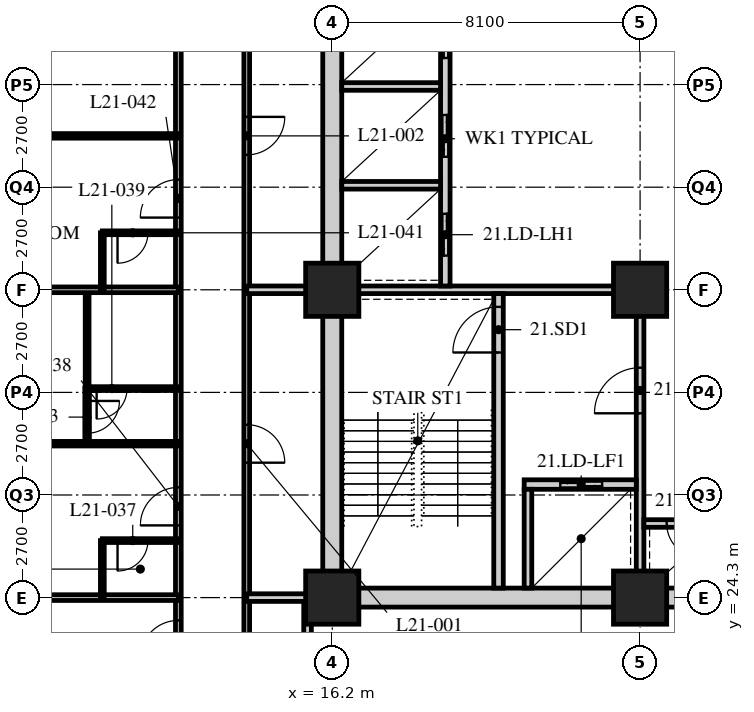
"""IFC4 building model, lengths in metres.
Left out: names, types, materials, properties, quantities, classifications, styles, units other than length and angle.
Written with IfcOpenShell. Run it as: python <this file> out.ifc"""

import sys

from ifc_helpers import new_model, si_unit, direction, frame, frame_2d, origin, origin_2d, place, context, subcontext, project, spatial, rectangle, hollow_rectangle, extrude, element, fill, save


model = new_model("IFC4")
c1 = context("Model", 3, precision=1e-05, world=origin(), true_north=direction((0.0, 1.0)))
c2 = subcontext(c1, "Body", "Model", "MODEL_VIEW")
j1 = project(units=[si_unit("LENGTHUNIT", "METRE"), si_unit("PLANEANGLEUNIT", "RADIAN")], contexts=[c1])
p1 = place(None, origin())
s1 = spatial("IfcSite", under=j1, at=p1, CompositionType="ELEMENT")
p2 = place(p1, origin())
s2 = spatial("IfcBuilding", under=s1, at=p2, CompositionType="ELEMENT")
p3 = place(p2, frame((0.0, 0.0, 84.0)))
s3 = spatial("IfcBuildingStorey", under=s2, at=p3, CompositionType="ELEMENT", Elevation=84.0)
for number, where, z_axis, x_axis in (
    (1, (16.2, 24.3, 0.0), (0.0, 0.0, 1.0), (1.0, 0.0, 0.0)),
    (2, (16.2, 32.4, 0.0), (0.0, 0.0, 1.0), (1.0, 0.0, 0.0)),
    (3, (24.3, 24.3, 0.0), (0.0, 0.0, 1.0), (1.0, 0.0, 0.0)),
    (4, (24.3, 32.4, 0.0), (0.0, 0.0, 1.0), (1.0, 0.0, 0.0)),
):
    element("IfcColumn", number, at=place(p3, frame(where, z_axis=z_axis, x_axis=x_axis)), inside=s3, PredefinedType="COLUMN", context=c2, shape_type="SweptSolid", body=[
        extrude(hollow_rectangle(XDim=1.4, YDim=1.4, WallThickness=0.12, at=origin_2d()), origin(), (0.0, 0.0, 1.0), 3.4),
    ])
p4 = place(p3, frame((12.15, 16.2, 0.0), z_axis=(0.0, 0.0, 1.0), x_axis=(0.0, 1.0, 0.0)))
e5 = element("IfcWall", 5, at=p4, inside=s3, PredefinedType="PARTITIONING", context=c2, shape_type="SweptSolid", body=[
    extrude(rectangle(XDim=26.1, YDim=0.15, at=frame_2d((13.05, 0.0))), origin(), (0.0, 0.0, 1.0), 3.19),
])
p5 = place(p4, frame((2.45, 0.0, 0.0)))
e6 = element("IfcOpeningElement", 6, at=p5, cuts=e5, PredefinedType="OPENING", context=c2, shape_type="SweptSolid", body=[
    extrude(rectangle(XDim=1.0, YDim=2.1, at=frame_2d((0.5, 1.05))), frame((0.0, 0.085, 0.0), z_axis=(0.0, -1.0, 0.0), x_axis=(1.0, 0.0, 0.0)), (0.0, 0.0, 1.0), 0.17),
])
p6 = place(p4, frame((6.5, 0.0, 0.0)))
e7 = element("IfcOpeningElement", 7, at=p6, cuts=e5, PredefinedType="OPENING", context=c2, shape_type="SweptSolid", body=[
    extrude(rectangle(XDim=1.0, YDim=2.1, at=frame_2d((0.5, 1.05))), frame((0.0, 0.085, 0.0), z_axis=(0.0, -1.0, 0.0), x_axis=(1.0, 0.0, 0.0)), (0.0, 0.0, 1.0), 0.17),
])
p7 = place(p4, frame((10.0, 0.0, 0.0)))
e8 = element("IfcOpeningElement", 8, at=p7, cuts=e5, PredefinedType="OPENING", context=c2, shape_type="SweptSolid", body=[
    extrude(rectangle(XDim=1.0, YDim=2.1, at=frame_2d((0.5, 1.05))), frame((0.0, 0.085, 0.0), z_axis=(0.0, -1.0, 0.0), x_axis=(1.0, 0.0, 0.0)), (0.0, 0.0, 1.0), 0.17),
])
p8 = place(p4, frame((18.1, 0.0, 0.0)))
e9 = element("IfcOpeningElement", 9, at=p8, cuts=e5, PredefinedType="OPENING", context=c2, shape_type="SweptSolid", body=[
    extrude(rectangle(XDim=1.0, YDim=2.1, at=frame_2d((0.5, 1.05))), frame((0.0, 0.085, 0.0), z_axis=(0.0, -1.0, 0.0), x_axis=(1.0, 0.0, 0.0)), (0.0, 0.0, 1.0), 0.17),
])
p9 = place(p3, frame((13.95, 40.5, 0.0), z_axis=(0.0, 0.0, 1.0), x_axis=(0.0, -1.0, 0.0)))
e10 = element("IfcWall", 10, at=p9, inside=s3, PredefinedType="PARTITIONING", context=c2, shape_type="SweptSolid", body=[
    extrude(rectangle(XDim=22.5, YDim=0.15, at=frame_2d((11.25, 0.0))), origin(), (0.0, 0.0, 1.0), 3.19),
])
p10 = place(p9, frame((11.65, 0.0, 0.0)))
e11 = element("IfcOpeningElement", 11, at=p10, cuts=e10, PredefinedType="OPENING", context=c2, shape_type="SweptSolid", body=[
    extrude(rectangle(XDim=1.0, YDim=2.1, at=frame_2d((0.5, 1.05))), frame((0.0, 0.085, 0.0), z_axis=(0.0, -1.0, 0.0), x_axis=(1.0, 0.0, 0.0)), (0.0, 0.0, 1.0), 0.17),
])
p11 = place(p9, frame((3.55, 0.0, 0.0)))
e12 = element("IfcOpeningElement", 12, at=p11, cuts=e10, PredefinedType="OPENING", context=c2, shape_type="SweptSolid", body=[
    extrude(rectangle(XDim=1.0, YDim=2.1, at=frame_2d((0.5, 1.05))), frame((0.0, 0.085, 0.0), z_axis=(0.0, -1.0, 0.0), x_axis=(1.0, 0.0, 0.0)), (0.0, 0.0, 1.0), 0.17),
])
p12 = place(p3, frame((13.95, 32.4, 0.0), z_axis=(0.0, 0.0, 1.0), x_axis=(1.0, 0.0, 0.0)))
e13 = element("IfcWall", 13, at=p12, inside=s3, PredefinedType="SOLIDWALL", context=c2, shape_type="SweptSolid", body=[
    extrude(rectangle(XDim=2.25, YDim=0.2, at=frame_2d((1.125, 0.0))), origin(), (0.0, 0.0, 1.0), 2.428),
])
p13 = place(p3, frame((15.55, 18.0, 0.0), z_axis=(0.0, 0.0, 1.0), x_axis=(0.0, 1.0, 0.0)))
e14 = element("IfcWall", 14, at=p13, inside=s3, PredefinedType="SOLIDWALL", context=c2, shape_type="SweptSolid", body=[
    extrude(rectangle(XDim=6.3, YDim=0.2, at=frame_2d((3.15, 0.0))), origin(), (0.0, 0.0, 1.0), 3.19),
])
p14 = place(p3, frame((13.95, 24.3, 0.0), z_axis=(0.0, 0.0, 1.0), x_axis=(1.0, 0.0, 0.0)))
e15 = element("IfcWall", 15, at=p14, inside=s3, PredefinedType="SOLIDWALL", context=c2, shape_type="SweptSolid", body=[
    extrude(rectangle(XDim=2.25, YDim=0.2, at=frame_2d((1.125, 0.0))), origin(), (0.0, 0.0, 1.0), 2.428),
])
p15 = place(p3, frame((12.15, 24.3, 0.0), z_axis=(0.0, 0.0, 1.0), x_axis=(-1.0, 0.0, 0.0)))
e16 = element("IfcWall", 16, at=p15, inside=s3, PredefinedType="PARTITIONING", context=c2, shape_type="SweptSolid", body=[
    extrude(rectangle(XDim=11.85, YDim=0.15, at=frame_2d((5.925, 0.0))), origin(), (0.0, 0.0, 1.0), 2.428),
])
p16 = place(p3, frame((10.15, 24.3, 0.0), z_axis=(0.0, 0.0, 1.0), x_axis=(0.0, 1.0, 0.0)))
e17 = element("IfcWall", 17, at=p16, inside=s3, PredefinedType="PARTITIONING", context=c2, shape_type="SweptSolid", body=[
    extrude(rectangle(XDim=1.5, YDim=0.1, at=frame_2d((0.75, 0.0))), origin(), (0.0, 0.0, 1.0), 3.19),
])
p17 = place(p3, frame((12.15, 25.8, 0.0), z_axis=(0.0, 0.0, 1.0), x_axis=(-1.0, 0.0, 0.0)))
e18 = element("IfcWall", 18, at=p17, inside=s3, PredefinedType="PARTITIONING", context=c2, shape_type="SweptSolid", body=[
    extrude(rectangle(XDim=2.0, YDim=0.1, at=frame_2d((1.0, 0.0))), origin(), (0.0, 0.0, 1.0), 3.19),
])
p18 = place(p17, frame((0.8, 0.0, 0.0)))
e19 = element("IfcOpeningElement", 19, at=p18, cuts=e18, PredefinedType="OPENING", context=c2, shape_type="SweptSolid", body=[
    extrude(rectangle(XDim=0.8, YDim=2.1, at=frame_2d((0.4, 1.05))), frame((0.0, 0.06, 0.0), z_axis=(0.0, -1.0, 0.0), x_axis=(1.0, 0.0, 0.0)), (0.0, 0.0, 1.0), 0.12),
])
p19 = place(p3, frame((9.75, 29.8, 0.0), z_axis=(0.0, 0.0, 1.0), x_axis=(0.0, 1.0, 0.0)))
e20 = element("IfcWall", 20, at=p19, inside=s3, PredefinedType="PARTITIONING", context=c2, shape_type="SweptSolid", body=[
    extrude(rectangle(XDim=2.6, YDim=0.1, at=frame_2d((1.3, 0.0))), origin(), (0.0, 0.0, 1.0), 3.19),
])
p20 = place(p3, frame((12.15, 29.8, 0.0), z_axis=(0.0, 0.0, 1.0), x_axis=(-1.0, 0.0, 0.0)))
e21 = element("IfcWall", 21, at=p20, inside=s3, PredefinedType="PARTITIONING", context=c2, shape_type="SweptSolid", body=[
    extrude(rectangle(XDim=2.4, YDim=0.1, at=frame_2d((1.2, 0.0))), origin(), (0.0, 0.0, 1.0), 3.19),
])
p21 = place(p20, frame((1.35, 0.0, 0.0)))
e22 = element("IfcOpeningElement", 22, at=p21, cuts=e21, PredefinedType="OPENING", context=c2, shape_type="SweptSolid", body=[
    extrude(rectangle(XDim=0.8, YDim=2.1, at=frame_2d((0.4, 1.05))), frame((0.0, 0.06, 0.0), z_axis=(0.0, -1.0, 0.0), x_axis=(1.0, 0.0, 0.0)), (0.0, 0.0, 1.0), 0.12),
])
p22 = place(p3, frame((12.15, 28.35, 0.0), z_axis=(0.0, 0.0, 1.0), x_axis=(-1.0, 0.0, 0.0)))
e23 = element("IfcWall", 23, at=p22, inside=s3, PredefinedType="PARTITIONING", context=c2, shape_type="SweptSolid", body=[
    extrude(rectangle(XDim=11.85, YDim=0.12, at=frame_2d((5.925, 0.0))), origin(), (0.0, 0.0, 1.0), 3.19),
])
p23 = place(p22, frame((6.85, 0.0, 0.0)))
e24 = element("IfcOpeningElement", 24, at=p23, cuts=e23, PredefinedType="OPENING", context=c2, shape_type="SweptSolid", body=[
    extrude(rectangle(XDim=0.85, YDim=2.1, at=frame_2d((0.425, 1.05))), frame((0.0, 0.07, 0.0), z_axis=(0.0, -1.0, 0.0), x_axis=(1.0, 0.0, 0.0)), (0.0, 0.0, 1.0), 0.14),
])
p24 = place(p3, frame((12.15, 32.4, 0.0), z_axis=(0.0, 0.0, 1.0), x_axis=(-1.0, 0.0, 0.0)))
e25 = element("IfcWall", 25, at=p24, inside=s3, PredefinedType="PARTITIONING", context=c2, shape_type="SweptSolid", body=[
    extrude(rectangle(XDim=11.85, YDim=0.15, at=frame_2d((5.925, 0.0))), origin(), (0.0, 0.0, 1.0), 2.428),
])
p25 = place(p3, frame((10.15, 32.4, 0.0), z_axis=(0.0, 0.0, 1.0), x_axis=(0.0, 1.0, 0.0)))
e26 = element("IfcWall", 26, at=p25, inside=s3, PredefinedType="PARTITIONING", context=c2, shape_type="SweptSolid", body=[
    extrude(rectangle(XDim=1.5, YDim=0.1, at=frame_2d((0.75, 0.0))), origin(), (0.0, 0.0, 1.0), 3.19),
])
p26 = place(p3, frame((12.15, 33.9, 0.0), z_axis=(0.0, 0.0, 1.0), x_axis=(-1.0, 0.0, 0.0)))
e27 = element("IfcWall", 27, at=p26, inside=s3, PredefinedType="PARTITIONING", context=c2, shape_type="SweptSolid", body=[
    extrude(rectangle(XDim=2.0, YDim=0.1, at=frame_2d((1.0, 0.0))), origin(), (0.0, 0.0, 1.0), 3.19),
])
p27 = place(p26, frame((0.8, 0.0, 0.0)))
e28 = element("IfcOpeningElement", 28, at=p27, cuts=e27, PredefinedType="OPENING", context=c2, shape_type="SweptSolid", body=[
    extrude(rectangle(XDim=0.8, YDim=2.1, at=frame_2d((0.4, 1.05))), frame((0.0, 0.06, 0.0), z_axis=(0.0, -1.0, 0.0), x_axis=(1.0, 0.0, 0.0)), (0.0, 0.0, 1.0), 0.12),
])
p28 = place(p3, frame((12.15, 36.45, 0.0), z_axis=(0.0, 0.0, 1.0), x_axis=(-1.0, 0.0, 0.0)))
e29 = element("IfcWall", 29, at=p28, inside=s3, PredefinedType="PARTITIONING", context=c2, shape_type="SweptSolid", body=[
    extrude(rectangle(XDim=11.85, YDim=0.12, at=frame_2d((5.925, 0.0))), origin(), (0.0, 0.0, 1.0), 3.19),
])
p29 = place(p28, frame((6.85, 0.0, 0.0)))
e30 = element("IfcOpeningElement", 30, at=p29, cuts=e29, PredefinedType="OPENING", context=c2, shape_type="SweptSolid", body=[
    extrude(rectangle(XDim=0.85, YDim=2.1, at=frame_2d((0.425, 1.05))), frame((0.0, 0.07, 0.0), z_axis=(0.0, -1.0, 0.0), x_axis=(1.0, 0.0, 0.0)), (0.0, 0.0, 1.0), 0.14),
])
p30 = place(p3, frame((9.75, 28.35, 0.0), z_axis=(0.0, 0.0, 1.0), x_axis=(0.0, 1.0, 0.0)))
e31 = element("IfcWall", 31, at=p30, inside=s3, PredefinedType="PARTITIONING", context=c2, shape_type="SweptSolid", body=[
    extrude(rectangle(XDim=1.46, YDim=0.12, at=frame_2d((0.73, 0.0))), origin(), (0.0, 0.0, 1.0), 3.19),
])
p31 = place(p30, frame((0.275, 0.0, 0.0)))
e32 = element("IfcOpeningElement", 32, at=p31, cuts=e31, PredefinedType="OPENING", context=c2, shape_type="SweptSolid", body=[
    extrude(rectangle(XDim=0.85, YDim=2.1, at=frame_2d((0.425, 1.05))), frame((0.0, 0.07, 0.0), z_axis=(0.0, -1.0, 0.0), x_axis=(1.0, 0.0, 0.0)), (0.0, 0.0, 1.0), 0.14),
])
p32 = place(p3, frame((15.95, 24.3, 0.0), z_axis=(0.0, 0.0, 1.0), x_axis=(1.0, 0.0, 0.0)))
e33 = element("IfcWall", 33, at=p32, inside=s3, PredefinedType="SOLIDWALL", context=c2, shape_type="SweptSolid", body=[
    extrude(rectangle(XDim=24.8, YDim=0.5, at=frame_2d((12.4, 0.0))), origin(), (0.0, 0.0, 1.0), 2.428),
])
p33 = place(p32, frame((11.5, 0.0, 0.0)))
e34 = element("IfcOpeningElement", 34, at=p33, cuts=e33, PredefinedType="OPENING", context=c2, shape_type="SweptSolid", body=[
    extrude(rectangle(XDim=1.8, YDim=2.4, at=frame_2d((0.9, 1.2))), frame((0.0, 0.26, 0.0), z_axis=(0.0, -1.0, 0.0), x_axis=(1.0, 0.0, 0.0)), (0.0, 0.0, 1.0), 0.52),
])
p34 = place(p3, frame((16.2, 24.55, 0.0), z_axis=(0.0, 0.0, 1.0), x_axis=(0.0, 1.0, 0.0)))
e35 = element("IfcWall", 35, at=p34, inside=s3, PredefinedType="SOLIDWALL", context=c2, shape_type="SweptSolid", body=[
    extrude(rectangle(XDim=15.7, YDim=0.5, at=frame_2d((7.85, 0.0))), origin(), (0.0, 0.0, 1.0), 2.428),
])
p35 = place(p3, frame((16.45, 32.4, 0.0), z_axis=(0.0, 0.0, 1.0), x_axis=(1.0, 0.0, 0.0)))
e36 = element("IfcWall", 36, at=p35, inside=s3, PredefinedType="SOLIDWALL", context=c2, shape_type="SweptSolid", body=[
    extrude(rectangle(XDim=7.95, YDim=0.2, at=frame_2d((3.975, 0.0))), origin(), (0.0, 0.0, 1.0), 2.578),
])
p36 = place(p3, frame((24.3, 24.55, 0.0), z_axis=(0.0, 0.0, 1.0), x_axis=(0.0, 1.0, 0.0)))
e37 = element("IfcWall", 37, at=p36, inside=s3, PredefinedType="SOLIDWALL", context=c2, shape_type="SweptSolid", body=[
    extrude(rectangle(XDim=7.75, YDim=0.2, at=frame_2d((3.875, 0.0))), origin(), (0.0, 0.0, 1.0), 2.578),
])
p37 = place(p36, frame((4.6, 0.0, 0.0)))
e38 = element("IfcOpeningElement", 38, at=p37, cuts=e37, PredefinedType="OPENING", context=c2, shape_type="SweptSolid", body=[
    extrude(rectangle(XDim=1.2, YDim=2.1, at=frame_2d((0.6, 1.05))), frame((0.0, 0.11, 0.0), z_axis=(0.0, -1.0, 0.0), x_axis=(1.0, 0.0, 0.0)), (0.0, 0.0, 1.0), 0.22),
])
p38 = place(p3, frame((20.575, 24.55, 0.0), z_axis=(0.0, 0.0, 1.0), x_axis=(0.0, 1.0, 0.0)))
e39 = element("IfcWall", 39, at=p38, inside=s3, PredefinedType="SOLIDWALL", context=c2, shape_type="SweptSolid", body=[
    extrude(rectangle(XDim=7.75, YDim=0.25, at=frame_2d((3.875, 0.0))), origin(), (0.0, 0.0, 1.0), 3.19),
])
p39 = place(p38, frame((6.2, 0.0, 0.0)))
e40 = element("IfcOpeningElement", 40, at=p39, cuts=e39, PredefinedType="OPENING", context=c2, shape_type="SweptSolid", body=[
    extrude(rectangle(XDim=1.2, YDim=2.1, at=frame_2d((0.6, 1.05))), frame((0.0, 0.135, 0.0), z_axis=(0.0, -1.0, 0.0), x_axis=(1.0, 0.0, 0.0)), (0.0, 0.0, 1.0), 0.27),
])
p40 = place(p3, frame((21.25, 27.275, 0.0), z_axis=(0.0, 0.0, 1.0), x_axis=(1.0, 0.0, 0.0)))
e41 = element("IfcWall", 41, at=p40, inside=s3, PredefinedType="SOLIDWALL", context=c2, shape_type="SweptSolid", body=[
    extrude(rectangle(XDim=2.95, YDim=0.25, at=frame_2d((1.475, 0.0))), origin(), (0.0, 0.0, 1.0), 3.19),
])
p41 = place(p40, frame((0.95, 0.0, 0.0)))
e42 = element("IfcOpeningElement", 42, at=p41, cuts=e41, PredefinedType="OPENING", context=c2, shape_type="SweptSolid", body=[
    extrude(rectangle(XDim=1.1, YDim=2.4, at=frame_2d((0.55, 1.2))), frame((0.0, 0.135, 0.0), z_axis=(0.0, -1.0, 0.0), x_axis=(1.0, 0.0, 0.0)), (0.0, 0.0, 1.0), 0.27),
])
p42 = place(p3, frame((21.35, 24.55, 0.0), z_axis=(0.0, 0.0, 1.0), x_axis=(0.0, 1.0, 0.0)))
e43 = element("IfcWall", 43, at=p42, inside=s3, PredefinedType="SOLIDWALL", context=c2, shape_type="SweptSolid", body=[
    extrude(rectangle(XDim=2.6, YDim=0.2, at=frame_2d((1.3, 0.0))), origin(), (0.0, 0.0, 1.0), 3.19),
])
p43 = place(p3, frame((19.175, 32.5, 0.0), z_axis=(0.0, 0.0, 1.0), x_axis=(0.0, 1.0, 0.0)))
e44 = element("IfcWall", 44, at=p43, inside=s3, PredefinedType="SOLIDWALL", context=c2, shape_type="SweptSolid", body=[
    extrude(rectangle(XDim=7.75, YDim=0.25, at=frame_2d((3.875, 0.0))), origin(), (0.0, 0.0, 1.0), 3.19),
])
p44 = place(p43, frame((0.8, 0.0, 0.0)))
e45 = element("IfcOpeningElement", 45, at=p44, cuts=e44, PredefinedType="OPENING", context=c2, shape_type="SweptSolid", body=[
    extrude(rectangle(XDim=1.1, YDim=2.4, at=frame_2d((0.55, 1.2))), frame((0.0, 0.135, 0.0), z_axis=(0.0, -1.0, 0.0), x_axis=(1.0, 0.0, 0.0)), (0.0, 0.0, 1.0), 0.27),
])
p45 = place(p43, frame((3.4, 0.0, 0.0)))
e46 = element("IfcOpeningElement", 46, at=p45, cuts=e44, PredefinedType="OPENING", context=c2, shape_type="SweptSolid", body=[
    extrude(rectangle(XDim=1.1, YDim=2.4, at=frame_2d((0.55, 1.2))), frame((0.0, 0.135, 0.0), z_axis=(0.0, -1.0, 0.0), x_axis=(1.0, 0.0, 0.0)), (0.0, 0.0, 1.0), 0.27),
])
p46 = place(p43, frame((6.0, 0.0, 0.0)))
e47 = element("IfcOpeningElement", 47, at=p46, cuts=e44, PredefinedType="OPENING", context=c2, shape_type="SweptSolid", body=[
    extrude(rectangle(XDim=1.1, YDim=2.4, at=frame_2d((0.55, 1.2))), frame((0.0, 0.135, 0.0), z_axis=(0.0, -1.0, 0.0), x_axis=(1.0, 0.0, 0.0)), (0.0, 0.0, 1.0), 0.27),
])
for number, where, z_axis, x_axis in (
    (48, (16.45, 35.15, 0.0), (0.0, 0.0, 1.0), (1.0, 0.0, 0.0)),
    (49, (16.45, 37.75, 0.0), (0.0, 0.0, 1.0), (1.0, 0.0, 0.0)),
):
    element("IfcWall", number, at=place(p3, frame(where, z_axis=z_axis, x_axis=x_axis)), inside=s3, PredefinedType="SOLIDWALL", context=c2, shape_type="SweptSolid", body=[
        extrude(rectangle(XDim=2.6, YDim=0.2, at=frame_2d((1.3, 0.0))), origin(), (0.0, 0.0, 1.0), 3.19),
    ])
p47 = place(p3, frame((24.4, 26.25, 0.0), z_axis=(0.0, 0.0, 1.0), x_axis=(1.0, 0.0, 0.0)))
e50 = element("IfcWall", 50, at=p47, inside=s3, PredefinedType="SOLIDWALL", context=c2, shape_type="SweptSolid", body=[
    extrude(rectangle(XDim=2.15, YDim=0.2, at=frame_2d((1.075, 0.0))), origin(), (0.0, 0.0, 1.0), 3.19),
])
p48 = place(p47, frame((0.6, 0.0, 0.0)))
e51 = element("IfcOpeningElement", 51, at=p48, cuts=e50, PredefinedType="OPENING", context=c2, shape_type="SweptSolid", body=[
    extrude(rectangle(XDim=0.9, YDim=2.1, at=frame_2d((0.45, 1.05))), frame((0.0, 0.11, 0.0), z_axis=(0.0, -1.0, 0.0), x_axis=(1.0, 0.0, 0.0)), (0.0, 0.0, 1.0), 0.22),
])
p49 = place(p10, origin())
e52 = element("IfcDoor", 52, at=p49, inside=s3, OperationType="SINGLE_SWING_RIGHT", PredefinedType="DOOR", context=c2, shape_type="SweptSolid", body=[
    extrude(rectangle(XDim=1.0, YDim=2.1, at=frame_2d((0.5, 1.05))), frame((0.0, 0.025, 0.0), z_axis=(0.0, -1.0, 0.0), x_axis=(1.0, 0.0, 0.0)), (0.0, 0.0, 1.0), 0.05),
])
fill(e11, e52)
p50 = place(p11, origin())
e53 = element("IfcDoor", 53, at=p50, inside=s3, OperationType="SINGLE_SWING_LEFT", PredefinedType="DOOR", context=c2, shape_type="SweptSolid", body=[
    extrude(rectangle(XDim=1.0, YDim=2.1, at=frame_2d((0.5, 1.05))), frame((0.0, 0.025, 0.0), z_axis=(0.0, -1.0, 0.0), x_axis=(1.0, 0.0, 0.0)), (0.0, 0.0, 1.0), 0.05),
])
fill(e12, e53)
p51 = place(p6, origin())
e54 = element("IfcDoor", 54, at=p51, inside=s3, OperationType="SINGLE_SWING_LEFT", PredefinedType="DOOR", context=c2, shape_type="SweptSolid", body=[
    extrude(rectangle(XDim=1.0, YDim=2.1, at=frame_2d((0.5, 1.05))), frame((0.0, 0.025, 0.0), z_axis=(0.0, -1.0, 0.0), x_axis=(1.0, 0.0, 0.0)), (0.0, 0.0, 1.0), 0.05),
])
fill(e7, e54)
p52 = place(p18, origin())
e55 = element("IfcDoor", 55, at=p52, inside=s3, OperationType="SINGLE_SWING_RIGHT", PredefinedType="DOOR", context=c2, shape_type="SweptSolid", body=[
    extrude(rectangle(XDim=0.8, YDim=2.1, at=frame_2d((0.4, 1.05))), frame((0.0, 0.025, 0.0), z_axis=(0.0, -1.0, 0.0), x_axis=(1.0, 0.0, 0.0)), (0.0, 0.0, 1.0), 0.05),
])
fill(e19, e55)
p53 = place(p7, origin())
e56 = element("IfcDoor", 56, at=p53, inside=s3, OperationType="SINGLE_SWING_LEFT", PredefinedType="DOOR", context=c2, shape_type="SweptSolid", body=[
    extrude(rectangle(XDim=1.0, YDim=2.1, at=frame_2d((0.5, 1.05))), frame((0.0, 0.025, 0.0), z_axis=(0.0, -1.0, 0.0), x_axis=(1.0, 0.0, 0.0)), (0.0, 0.0, 1.0), 0.05),
])
fill(e8, e56)
p54 = place(p21, origin())
e57 = element("IfcDoor", 57, at=p54, inside=s3, OperationType="SINGLE_SWING_RIGHT", PredefinedType="DOOR", context=c2, shape_type="SweptSolid", body=[
    extrude(rectangle(XDim=0.8, YDim=2.1, at=frame_2d((0.4, 1.05))), frame((0.0, 0.025, 0.0), z_axis=(0.0, -1.0, 0.0), x_axis=(1.0, 0.0, 0.0)), (0.0, 0.0, 1.0), 0.05),
])
fill(e22, e57)
p55 = place(p27, origin())
e58 = element("IfcDoor", 58, at=p55, inside=s3, OperationType="SINGLE_SWING_RIGHT", PredefinedType="DOOR", context=c2, shape_type="SweptSolid", body=[
    extrude(rectangle(XDim=0.8, YDim=2.1, at=frame_2d((0.4, 1.05))), frame((0.0, 0.025, 0.0), z_axis=(0.0, -1.0, 0.0), x_axis=(1.0, 0.0, 0.0)), (0.0, 0.0, 1.0), 0.05),
])
fill(e28, e58)
p56 = place(p8, origin())
e59 = element("IfcDoor", 59, at=p56, inside=s3, OperationType="SINGLE_SWING_LEFT", PredefinedType="DOOR", context=c2, shape_type="SweptSolid", body=[
    extrude(rectangle(XDim=1.0, YDim=2.1, at=frame_2d((0.5, 1.05))), frame((0.0, 0.025, 0.0), z_axis=(0.0, -1.0, 0.0), x_axis=(1.0, 0.0, 0.0)), (0.0, 0.0, 1.0), 0.05),
])
fill(e9, e59)
p57 = place(p31, origin())
e60 = element("IfcDoor", 60, at=p57, inside=s3, OperationType="SINGLE_SWING_LEFT", PredefinedType="DOOR", context=c2, shape_type="SweptSolid", body=[
    extrude(rectangle(XDim=0.85, YDim=2.1, at=frame_2d((0.425, 1.05))), frame((0.0, 0.025, 0.0), z_axis=(0.0, -1.0, 0.0), x_axis=(1.0, 0.0, 0.0)), (0.0, 0.0, 1.0), 0.05),
])
fill(e32, e60)
p58 = place(p39, origin())
e61 = element("IfcDoor", 61, at=p58, inside=s3, OperationType="SINGLE_SWING_LEFT", PredefinedType="DOOR", context=c2, shape_type="SweptSolid", body=[
    extrude(rectangle(XDim=1.2, YDim=2.1, at=frame_2d((0.6, 1.05))), frame((0.0, 0.025, 0.0), z_axis=(0.0, -1.0, 0.0), x_axis=(1.0, 0.0, 0.0)), (0.0, 0.0, 1.0), 0.05),
])
fill(e40, e61)
p59 = place(p37, origin())
e62 = element("IfcDoor", 62, at=p59, inside=s3, OperationType="SINGLE_SWING_LEFT", PredefinedType="DOOR", context=c2, shape_type="SweptSolid", body=[
    extrude(rectangle(XDim=1.2, YDim=2.1, at=frame_2d((0.6, 1.05))), frame((0.0, 0.025, 0.0), z_axis=(0.0, -1.0, 0.0), x_axis=(1.0, 0.0, 0.0)), (0.0, 0.0, 1.0), 0.05),
])
fill(e38, e62)
p60 = place(p48, origin())
e63 = element("IfcDoor", 63, at=p60, inside=s3, OperationType="SINGLE_SWING_LEFT", PredefinedType="DOOR", context=c2, shape_type="SweptSolid", body=[
    extrude(rectangle(XDim=0.9, YDim=2.1, at=frame_2d((0.45, 1.05))), frame((0.0, 0.025, 0.0), z_axis=(0.0, -1.0, 0.0), x_axis=(1.0, 0.0, 0.0)), (0.0, 0.0, 1.0), 0.05),
])
fill(e51, e63)
p61 = place(p44, origin())
e64 = element("IfcDoor", 64, at=p61, inside=s3, OperationType="DOUBLE_DOOR_SLIDING", PredefinedType="DOOR", context=c2, shape_type="SweptSolid", body=[
    extrude(rectangle(XDim=1.1, YDim=2.4, at=frame_2d((0.55, 1.2))), frame((0.0, 0.025, 0.0), z_axis=(0.0, -1.0, 0.0), x_axis=(1.0, 0.0, 0.0)), (0.0, 0.0, 1.0), 0.05),
])
fill(e45, e64)
p62 = place(p45, origin())
e65 = element("IfcDoor", 65, at=p62, inside=s3, OperationType="DOUBLE_DOOR_SLIDING", PredefinedType="DOOR", context=c2, shape_type="SweptSolid", body=[
    extrude(rectangle(XDim=1.1, YDim=2.4, at=frame_2d((0.55, 1.2))), frame((0.0, 0.025, 0.0), z_axis=(0.0, -1.0, 0.0), x_axis=(1.0, 0.0, 0.0)), (0.0, 0.0, 1.0), 0.05),
])
fill(e46, e65)
p63 = place(p46, origin())
e66 = element("IfcDoor", 66, at=p63, inside=s3, OperationType="DOUBLE_DOOR_SLIDING", PredefinedType="DOOR", context=c2, shape_type="SweptSolid", body=[
    extrude(rectangle(XDim=1.1, YDim=2.4, at=frame_2d((0.55, 1.2))), frame((0.0, 0.025, 0.0), z_axis=(0.0, -1.0, 0.0), x_axis=(1.0, 0.0, 0.0)), (0.0, 0.0, 1.0), 0.05),
])
fill(e47, e66)
p64 = place(p41, origin())
e67 = element("IfcDoor", 67, at=p64, inside=s3, OperationType="DOUBLE_DOOR_SLIDING", PredefinedType="DOOR", context=c2, shape_type="SweptSolid", body=[
    extrude(rectangle(XDim=1.1, YDim=2.4, at=frame_2d((0.55, 1.2))), frame((0.0, 0.025, 0.0), z_axis=(0.0, -1.0, 0.0), x_axis=(1.0, 0.0, 0.0)), (0.0, 0.0, 1.0), 0.05),
])
fill(e42, e67)
save(model, sys.argv[1])
